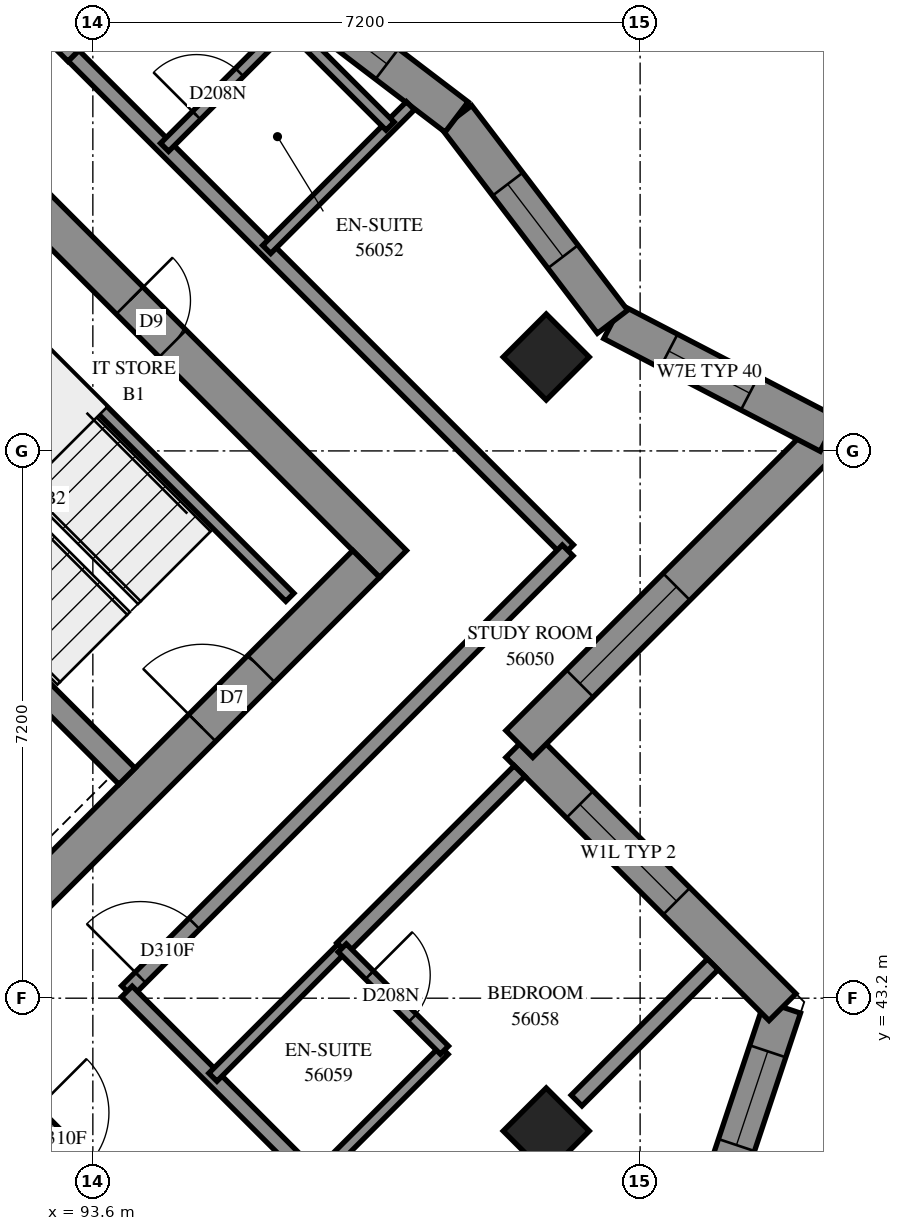
"""IFC4 building model, lengths in metres.
Left out: names, types, materials, properties, quantities, classifications, styles, units other than length and angle.
Written with IfcOpenShell. Run it as: python <this file> out.ifc"""

import sys

from ifc_helpers import new_model, si_unit, direction, frame, frame_2d, origin, origin_2d, place, context, subcontext, project, spatial, polyline, rectangle, outline, extrude, element, fill, save


model = new_model("IFC4")
c1 = context("Model", 3, precision=1e-05, world=origin(), true_north=direction((0.0, 1.0)))
c2 = subcontext(c1, "Body", "Model", "MODEL_VIEW")
j1 = project(units=[si_unit("LENGTHUNIT", "METRE"), si_unit("PLANEANGLEUNIT", "RADIAN")], contexts=[c1])
p1 = place(None, origin())
s1 = spatial("IfcSite", under=j1, at=p1, CompositionType="ELEMENT")
p2 = place(p1, origin())
s2 = spatial("IfcBuilding", under=s1, at=p2, CompositionType="ELEMENT")
p3 = place(p2, frame((0.0, 0.0, 206.6)))
s3 = spatial("IfcBuildingStorey", under=s2, at=p3, CompositionType="ELEMENT", Elevation=206.6)
for number, where, z_axis, x_axis in (
    (1, (99.565, 51.635, 0.0), (0.0, 0.0, 1.0), (0.707, -0.707, 0.0)),
    (2, (99.565, 41.453, 0.0), (0.0, 0.0, 1.0), (0.707, -0.707, 0.0)),
):
    element("IfcColumn", number, at=place(p3, frame(where, z_axis=z_axis, x_axis=x_axis)), inside=s3, PredefinedType="COLUMN", context=c2, shape_type="SweptSolid", body=[
        extrude(rectangle(XDim=0.8, YDim=0.8, at=origin_2d()), origin(), (0.0, 0.0, 1.0), 3.1),
    ])
p4 = place(p3, frame((86.66, 59.802, -0.3), z_axis=(0.0, 0.0, 1.0), x_axis=(0.7071067812, -0.7071067812, 0.0)))
e3 = element("IfcWall", 3, at=p4, inside=s3, PredefinedType="SHEAR", context=c2, shape_type="SweptSolid", body=[
    extrude(rectangle(XDim=15.4, YDim=0.5, at=frame_2d((7.7, 0.0))), origin(), (0.0, 0.0, 1.0), 2.7),
])
p5 = place(p4, frame((10.5, 0.0, 0.3)))
e4 = element("IfcOpeningElement", 4, at=p5, cuts=e3, PredefinedType="OPENING", context=c2, shape_type="SweptSolid", body=[
    extrude(rectangle(XDim=0.8, YDim=2.1, at=frame_2d((0.4, 1.05))), frame((0.0, 0.26, 0.0), z_axis=(0.0, -1.0, 0.0), x_axis=(1.0, 0.0, 0.0)), (0.0, 0.0, 1.0), 0.52),
])
p6 = place(p3, frame((87.013, 38.731, -0.3), z_axis=(0.0, 0.0, 1.0), x_axis=(0.7071067812, 0.7071067812, 0.0)))
e5 = element("IfcWall", 5, at=p6, inside=s3, PredefinedType="SHEAR", context=c2, shape_type="SweptSolid", body=[
    extrude(rectangle(XDim=14.4, YDim=0.5, at=frame_2d((7.2, 0.0))), origin(), (0.0, 0.0, 1.0), 2.7),
])
p7 = place(p6, frame((4.55, 0.0, 0.3)))
e6 = element("IfcOpeningElement", 6, at=p7, cuts=e5, PredefinedType="OPENING", context=c2, shape_type="SweptSolid", body=[
    extrude(rectangle(XDim=1.1, YDim=2.1, at=frame_2d((0.55, 1.05))), frame((0.0, 0.26, 0.0), z_axis=(0.0, -1.0, 0.0), x_axis=(1.0, 0.0, 0.0)), (0.0, 0.0, 1.0), 0.52),
])
p8 = place(p6, frame((11.35, 0.0, 0.3)))
e7 = element("IfcOpeningElement", 7, at=p8, cuts=e5, PredefinedType="OPENING", context=c2, shape_type="SweptSolid", body=[
    extrude(rectangle(XDim=1.1, YDim=2.1, at=frame_2d((0.55, 1.05))), frame((0.0, 0.26, 0.0), z_axis=(0.0, -1.0, 0.0), x_axis=(1.0, 0.0, 0.0)), (0.0, 0.0, 1.0), 0.52),
])
p9 = place(p3, frame((88.958, 51.211, 0.0), z_axis=(0.0, 0.0, 1.0), x_axis=(0.7070998367, -0.7071137256, 0.0)))
e8 = element("IfcWall", 8, at=p9, inside=s3, PredefinedType="SOLIDWALL", context=c2, shape_type="SweptSolid", body=[
    extrude(rectangle(XDim=7.2, YDim=0.3, at=frame_2d((3.6, 0.0))), origin(), (0.0, 0.0, 1.0), 3.1),
])
p10 = place(p3, frame((101.062, 38.252, 0.0), z_axis=(0.0, 0.0, 1.0), x_axis=(0.3162395484, 0.9486793705, 0.0)))
e9 = element("IfcWall", 9, at=p10, inside=s3, PredefinedType="SOLIDWALL", context=c2, shape_type="SweptSolid", body=[
    extrude(outline(polyline([(-0.12, -0.25), (5.247, -0.25), (4.938, 0.25), (0.12, 0.25), (-0.12, -0.25)])), origin(), (0.0, 0.0, 1.0), 3.1),
])
p11 = place(p10, frame((1.68, 0.0, 0.45)))
e10 = element("IfcOpeningElement", 10, at=p11, cuts=e9, PredefinedType="OPENING", context=c2, shape_type="SweptSolid", body=[
    extrude(rectangle(XDim=1.3, YDim=2.5, at=frame_2d((0.65, 1.25))), frame((0.0, 0.26, 0.0), z_axis=(0.0, -1.0, 0.0), x_axis=(1.0, 0.0, 0.0)), (0.0, 0.0, 1.0), 0.52),
])
p12 = place(p10, frame((3.18, 0.0, 0.45)))
e11 = element("IfcOpeningElement", 11, at=p12, cuts=e9, PredefinedType="OPENING", context=c2, shape_type="SweptSolid", body=[
    extrude(rectangle(XDim=1.3, YDim=2.5, at=frame_2d((0.65, 1.25))), frame((0.0, 0.26, 0.0), z_axis=(0.0, -1.0, 0.0), x_axis=(1.0, 0.0, 0.0)), (0.0, 0.0, 1.0), 0.52),
])
p13 = place(p3, frame((102.673, 43.083, 0.0), z_axis=(0.0, 0.0, 1.0), x_axis=(-0.7071067812, 0.7071067812, 0.0)))
e12 = element("IfcWall", 12, at=p13, inside=s3, PredefinedType="SOLIDWALL", context=c2, shape_type="SweptSolid", body=[
    extrude(outline(polyline([(-0.154, -0.25), (4.646, -0.25), (5.146, 0.25), (0.154, 0.25), (-0.154, -0.25)])), origin(), (0.0, 0.0, 1.0), 3.1),
])
p14 = place(p13, frame((1.97, 0.0, 0.6)))
e13 = element("IfcOpeningElement", 13, at=p14, cuts=e12, PredefinedType="OPENING", context=c2, shape_type="SweptSolid", body=[
    extrude(rectangle(XDim=1.8, YDim=1.9, at=frame_2d((0.9, 0.95))), frame((0.0, 0.26, 0.0), z_axis=(0.0, -1.0, 0.0), x_axis=(1.0, 0.0, 0.0)), (0.0, 0.0, 1.0), 0.52),
])
p15 = place(p3, frame((99.211, 46.544, 0.0), z_axis=(0.0, 0.0, 1.0), x_axis=(0.7071067812, 0.7071067812, 0.0)))
e14 = element("IfcWall", 14, at=p15, inside=s3, PredefinedType="SOLIDWALL", context=c2, shape_type="SweptSolid", body=[
    extrude(outline(polyline([(0.25, -0.25), (6.101, -0.25), (5.419, 0.25), (-0.25, 0.25), (0.25, -0.25)])), origin(), (0.0, 0.0, 1.0), 3.1),
])
p16 = place(p15, frame((1.125, 0.0, 0.6)))
e15 = element("IfcOpeningElement", 15, at=p16, cuts=e14, PredefinedType="OPENING", context=c2, shape_type="SweptSolid", body=[
    extrude(rectangle(XDim=1.8, YDim=1.9, at=frame_2d((0.9, 0.95))), frame((0.0, 0.26, 0.0), z_axis=(0.0, -1.0, 0.0), x_axis=(1.0, 0.0, 0.0)), (0.0, 0.0, 1.0), 0.52),
])
p17 = place(p3, frame((103.284, 50.617, 0.0), z_axis=(0.0, 0.0, 1.0), x_axis=(-0.8870249402, 0.4617215129, 0.0)))
e16 = element("IfcWall", 16, at=p17, inside=s3, PredefinedType="SOLIDWALL", context=c2, shape_type="SweptSolid", body=[
    extrude(outline(polyline([(-0.341, -0.25), (3.154, -0.25), (3.266, 0.25), (0.341, 0.25), (-0.341, -0.25)])), origin(), (0.0, 0.0, 1.0), 3.1),
])
p18 = place(p17, frame((1.175, 0.0, 0.45)))
e17 = element("IfcOpeningElement", 17, at=p18, cuts=e16, PredefinedType="OPENING", context=c2, shape_type="SweptSolid", body=[
    extrude(rectangle(XDim=1.2, YDim=2.5, at=frame_2d((0.6, 1.25))), frame((0.0, 0.26, 0.0), z_axis=(0.0, -1.0, 0.0), x_axis=(1.0, 0.0, 0.0)), (0.0, 0.0, 1.0), 0.52),
])
p19 = place(p3, frame((100.437, 52.099, 0.0), z_axis=(0.0, 0.0, 1.0), x_axis=(-0.6059097208, 0.7955334124, 0.0)))
e18 = element("IfcWall", 18, at=p19, inside=s3, PredefinedType="SOLIDWALL", context=c2, shape_type="SweptSolid", body=[
    extrude(outline(polyline([(0.056, -0.25), (3.42, -0.25), (3.352, 0.25), (-0.056, 0.25), (0.056, -0.25)])), origin(), (0.0, 0.0, 1.0), 3.1),
])
p20 = place(p19, frame((1.076, 0.0, 0.45)))
e19 = element("IfcOpeningElement", 19, at=p20, cuts=e18, PredefinedType="OPENING", context=c2, shape_type="SweptSolid", body=[
    extrude(rectangle(XDim=1.2, YDim=2.5, at=frame_2d((0.6, 1.25))), frame((0.0, 0.26, 0.0), z_axis=(0.0, -1.0, 0.0), x_axis=(1.0, 0.0, 0.0)), (0.0, 0.0, 1.0), 0.52),
])
p21 = place(p3, frame((98.385, 54.793, 0.0), z_axis=(0.0, 0.0, 1.0), x_axis=(-0.7955183856, 0.6059294498, 0.0)))
e20 = element("IfcWall", 20, at=p21, inside=s3, PredefinedType="SOLIDWALL", context=c2, shape_type="SweptSolid", body=[
    extrude(outline(polyline([(-0.034, -0.25), (3.33, -0.25), (3.397, 0.25), (0.034, 0.25), (-0.034, -0.25)])), origin(), (0.0, 0.0, 1.0), 3.1),
])
p22 = place(p21, frame((1.151, 0.0, 0.45)))
e21 = element("IfcOpeningElement", 21, at=p22, cuts=e20, PredefinedType="OPENING", context=c2, shape_type="SweptSolid", body=[
    extrude(rectangle(XDim=1.2, YDim=2.5, at=frame_2d((0.6, 1.25))), frame((0.0, 0.26, 0.0), z_axis=(0.0, -1.0, 0.0), x_axis=(1.0, 0.0, 0.0)), (0.0, 0.0, 1.0), 0.52),
])
p23 = place(p3, frame((91.313, 53.354, 0.0), z_axis=(0.0, 0.0, 1.0), x_axis=(0.7071140275, -0.7070995348, 0.0)))
e22 = element("IfcWall", 22, at=p23, inside=s3, PredefinedType="PARTITIONING", context=c2, shape_type="SweptSolid", body=[
    extrude(rectangle(XDim=6.9, YDim=0.15, at=frame_2d((3.45, 0.0))), origin(), (0.0, 0.0, 1.0), 3.1),
])
p24 = place(p3, frame((93.346, 55.599, 0.0), z_axis=(0.0, 0.0, 1.0), x_axis=(0.7071067812, -0.7071067812, 0.0)))
e23 = element("IfcWall", 23, at=p24, inside=s3, PredefinedType="PARTITIONING", context=c2, shape_type="SweptSolid", body=[
    extrude(rectangle(XDim=9.201, YDim=0.2, at=frame_2d((4.601, 0.0))), origin(), (0.0, 0.0, 1.0), 3.1),
])
p25 = place(p3, frame((94.049, 43.293, 0.0), z_axis=(0.0, 0.0, 1.0), x_axis=(0.7071067812, 0.7071067812, 0.0)))
e24 = element("IfcWall", 24, at=p25, inside=s3, PredefinedType="PARTITIONING", context=c2, shape_type="SweptSolid", body=[
    extrude(rectangle(XDim=8.2, YDim=0.2, at=frame_2d((4.1, 0.0))), origin(), (0.0, 0.0, 1.0), 3.1),
])
p26 = place(p25, frame((0.252, 0.0, 0.0)))
e25 = element("IfcOpeningElement", 25, at=p26, cuts=e24, PredefinedType="OPENING", context=c2, shape_type="SweptSolid", body=[
    extrude(rectangle(XDim=1.0, YDim=2.1, at=frame_2d((0.5, 1.05))), frame((0.0, 0.11, 0.0), z_axis=(0.0, -1.0, 0.0), x_axis=(1.0, 0.0, 0.0)), (0.0, 0.0, 1.0), 0.22),
])
p27 = place(p3, frame((94.047, 43.287, 0.0), z_axis=(0.0, 0.0, 1.0), x_axis=(0.7071067812, -0.7071067812, 0.0)))
e26 = element("IfcWall", 26, at=p27, inside=s3, PredefinedType="PARTITIONING", context=c2, shape_type="SweptSolid", body=[
    extrude(rectangle(XDim=5.199, YDim=0.2, at=frame_2d((2.599, 0.0))), origin(), (0.0, 0.0, 1.0), 3.1),
])
p28 = place(p27, frame((3.898, 0.0, 0.0)))
e27 = element("IfcOpeningElement", 27, at=p28, cuts=e26, PredefinedType="OPENING", context=c2, shape_type="SweptSolid", body=[
    extrude(rectangle(XDim=0.9, YDim=2.1, at=frame_2d((0.45, 1.05))), frame((0.0, 0.11, 0.0), z_axis=(0.0, -1.0, 0.0), x_axis=(1.0, 0.0, 0.0)), (0.0, 0.0, 1.0), 0.22),
])
p29 = place(p3, frame((92.633, 41.873, 0.0), z_axis=(0.0, 0.0, 1.0), x_axis=(0.7071067812, -0.7071067812, 0.0)))
e28 = element("IfcWall", 28, at=p29, inside=s3, PredefinedType="PARTITIONING", context=c2, shape_type="SweptSolid", body=[
    extrude(rectangle(XDim=5.199, YDim=0.2, at=frame_2d((2.599, 0.0))), origin(), (0.0, 0.0, 1.0), 3.1),
])
p30 = place(p29, frame((0.253, 0.0, 0.0)))
e29 = element("IfcOpeningElement", 29, at=p30, cuts=e28, PredefinedType="OPENING", context=c2, shape_type="SweptSolid", body=[
    extrude(rectangle(XDim=1.0, YDim=2.1, at=frame_2d((0.5, 1.05))), frame((0.0, 0.11, 0.0), z_axis=(0.0, -1.0, 0.0), x_axis=(1.0, 0.0, 0.0)), (0.0, 0.0, 1.0), 0.22),
])
p31 = place(p29, frame((3.948, 0.0, 0.0)))
e30 = element("IfcOpeningElement", 30, at=p31, cuts=e28, PredefinedType="OPENING", context=c2, shape_type="SweptSolid", body=[
    extrude(rectangle(XDim=0.9, YDim=2.1, at=frame_2d((0.45, 1.05))), frame((0.0, 0.11, 0.0), z_axis=(0.0, -1.0, 0.0), x_axis=(1.0, 0.0, 0.0)), (0.0, 0.0, 1.0), 0.22),
])
p32 = place(p3, frame((96.88, 43.856, 0.0), z_axis=(0.0, 0.0, 1.0), x_axis=(0.7074098182, 0.7068036142, 0.0)))
e31 = element("IfcWall", 31, at=p32, inside=s3, PredefinedType="PARTITIONING", context=c2, shape_type="SweptSolid", body=[
    extrude(rectangle(XDim=3.299, YDim=0.2, at=frame_2d((1.65, 0.0))), origin(), (0.0, 0.0, 1.0), 3.1),
])
p33 = place(p3, frame((95.887, 53.051, 0.0), z_axis=(0.0, 0.0, 1.0), x_axis=(0.7070880799, 0.707125482, 0.0)))
e32 = element("IfcWall", 32, at=p33, inside=s3, PredefinedType="PARTITIONING", context=c2, shape_type="SweptSolid", body=[
    extrude(rectangle(XDim=2.674, YDim=0.15, at=frame_2d((1.337, 0.0))), origin(), (0.0, 0.0, 1.0), 3.1),
])
p34 = place(p3, frame((99.964, 41.854, 0.0), z_axis=(0.0, 0.0, 1.0), x_axis=(0.7071265121, 0.7070870497, 0.0)))
e33 = element("IfcWall", 33, at=p34, inside=s3, PredefinedType="PARTITIONING", context=c2, shape_type="SweptSolid", body=[
    extrude(rectangle(XDim=2.534, YDim=0.2, at=frame_2d((1.267, 0.0))), origin(), (0.0, 0.0, 1.0), 3.1),
])
for number, where, z_axis, x_axis in (
    (34, (96.523, 40.817, 0.0), (0.0, 0.0, 1.0), (0.707, 0.707, 0.0)),
    (35, (95.179, 42.161, 0.0), (0.0, 0.0, 1.0), (0.707, 0.707, 0.0)),
):
    element("IfcWall", number, at=place(p3, frame(where, z_axis=z_axis, x_axis=x_axis)), inside=s3, PredefinedType="PARTITIONING", context=c2, shape_type="SweptSolid", body=[
        extrude(rectangle(XDim=2.401, YDim=0.15, at=frame_2d((1.201, 0.0))), origin(), (0.0, 0.0, 1.0), 3.1),
    ])
p35 = place(p3, frame((94.544, 54.394, 0.0), z_axis=(0.0, 0.0, 1.0), x_axis=(0.7070860901, 0.7071274716, 0.0)))
e36 = element("IfcWall", 36, at=p35, inside=s3, PredefinedType="PARTITIONING", context=c2, shape_type="SweptSolid", body=[
    extrude(rectangle(XDim=2.417, YDim=0.15, at=frame_2d((1.208, 0.0))), origin(), (0.0, 0.0, 1.0), 3.1),
])
p36 = place(p35, frame((0.594, 0.0, 0.0)))
e37 = element("IfcOpeningElement", 37, at=p36, cuts=e36, PredefinedType="OPENING", context=c2, shape_type="SweptSolid", body=[
    extrude(rectangle(XDim=0.8, YDim=2.1, at=frame_2d((0.4, 1.05))), frame((0.0, 0.085, 0.0), z_axis=(0.0, -1.0, 0.0), x_axis=(1.0, 0.0, 0.0)), (0.0, 0.0, 1.0), 0.17),
])
p37 = place(p3, frame((96.167, 56.017, 0.0), z_axis=(0.0, 0.0, 1.0), x_axis=(0.7071067812, -0.7071067812, 0.0)))
e38 = element("IfcWall", 38, at=p37, inside=s3, PredefinedType="PARTITIONING", context=c2, shape_type="SweptSolid", body=[
    extrude(rectangle(XDim=1.901, YDim=0.15, at=frame_2d((0.95, 0.0))), origin(), (0.0, 0.0, 1.0), 3.1),
])
p38 = place(p3, frame((96.881, 43.861, 0.0), z_axis=(0.0, 0.0, 1.0), x_axis=(0.7071067812, -0.7071067812, 0.0)))
e39 = element("IfcWall", 39, at=p38, inside=s3, PredefinedType="PARTITIONING", context=c2, shape_type="SweptSolid", body=[
    extrude(rectangle(XDim=1.901, YDim=0.15, at=frame_2d((0.95, 0.0))), origin(), (0.0, 0.0, 1.0), 3.1),
])
p39 = place(p38, frame((0.505, 0.0, 0.0)))
e40 = element("IfcOpeningElement", 40, at=p39, cuts=e39, PredefinedType="OPENING", context=c2, shape_type="SweptSolid", body=[
    extrude(rectangle(XDim=0.8, YDim=2.1, at=frame_2d((0.4, 1.05))), frame((0.0, 0.085, 0.0), z_axis=(0.0, -1.0, 0.0), x_axis=(1.0, 0.0, 0.0)), (0.0, 0.0, 1.0), 0.17),
])
p40 = place(p3, frame((92.311, 56.627, 0.0), z_axis=(0.0, 0.0, 1.0), x_axis=(0.7077922938, -0.7064206033, 0.0)))
e41 = element("IfcWall", 41, at=p40, inside=s3, PredefinedType="PARTITIONING", context=c2, shape_type="SweptSolid", body=[
    extrude(rectangle(XDim=1.458, YDim=0.2, at=frame_2d((0.729, 0.0))), origin(), (0.0, 0.0, 1.0), 3.1),
])
p41 = place(p12, origin())
e42 = element("IfcWindow", 42, at=p41, inside=s3, PartitioningType="SINGLE_PANEL", PredefinedType="WINDOW", context=c2, shape_type="SweptSolid", body=[
    extrude(rectangle(XDim=1.3, YDim=2.5, at=frame_2d((0.65, 1.25))), frame((0.0, 0.18, 0.0), z_axis=(0.0, -1.0, 0.0), x_axis=(1.0, 0.0, 0.0)), (0.0, 0.0, 1.0), 0.06),
])
fill(e11, e42)
p42 = place(p14, origin())
e43 = element("IfcWindow", 43, at=p42, inside=s3, PartitioningType="SINGLE_PANEL", PredefinedType="WINDOW", context=c2, shape_type="SweptSolid", body=[
    extrude(rectangle(XDim=1.8, YDim=1.9, at=frame_2d((0.9, 0.95))), frame((0.0, 0.18, 0.0), z_axis=(0.0, -1.0, 0.0), x_axis=(1.0, 0.0, 0.0)), (0.0, 0.0, 1.0), 0.06),
])
fill(e13, e43)
p43 = place(p16, origin())
e44 = element("IfcWindow", 44, at=p43, inside=s3, PartitioningType="SINGLE_PANEL", PredefinedType="WINDOW", context=c2, shape_type="SweptSolid", body=[
    extrude(rectangle(XDim=1.8, YDim=1.9, at=frame_2d((0.9, 0.95))), frame((0.0, 0.18, 0.0), z_axis=(0.0, -1.0, 0.0), x_axis=(1.0, 0.0, 0.0)), (0.0, 0.0, 1.0), 0.06),
])
fill(e15, e44)
p44 = place(p18, origin())
e45 = element("IfcWindow", 45, at=p44, inside=s3, PartitioningType="SINGLE_PANEL", PredefinedType="WINDOW", context=c2, shape_type="SweptSolid", body=[
    extrude(rectangle(XDim=1.2, YDim=2.5, at=frame_2d((0.6, 1.25))), frame((0.0, 0.18, 0.0), z_axis=(0.0, -1.0, 0.0), x_axis=(1.0, 0.0, 0.0)), (0.0, 0.0, 1.0), 0.06),
])
fill(e17, e45)
p45 = place(p20, origin())
e46 = element("IfcWindow", 46, at=p45, inside=s3, PartitioningType="SINGLE_PANEL", PredefinedType="WINDOW", context=c2, shape_type="SweptSolid", body=[
    extrude(rectangle(XDim=1.2, YDim=2.5, at=frame_2d((0.6, 1.25))), frame((0.0, 0.18, 0.0), z_axis=(0.0, -1.0, 0.0), x_axis=(1.0, 0.0, 0.0)), (0.0, 0.0, 1.0), 0.06),
])
fill(e19, e46)
p46 = place(p22, origin())
e47 = element("IfcWindow", 47, at=p46, inside=s3, PartitioningType="SINGLE_PANEL", PredefinedType="WINDOW", context=c2, shape_type="SweptSolid", body=[
    extrude(rectangle(XDim=1.2, YDim=2.5, at=frame_2d((0.6, 1.25))), frame((0.0, 0.18, 0.0), z_axis=(0.0, -1.0, 0.0), x_axis=(1.0, 0.0, 0.0)), (0.0, 0.0, 1.0), 0.06),
])
fill(e21, e47)
p47 = place(p5, origin())
e48 = element("IfcDoor", 48, at=p47, inside=s3, OperationType="SINGLE_SWING_RIGHT", PredefinedType="DOOR", context=c2, shape_type="SweptSolid", body=[
    extrude(rectangle(XDim=0.8, YDim=2.1, at=frame_2d((0.4, 1.05))), frame((0.0, 0.025, 0.0), z_axis=(0.0, -1.0, 0.0), x_axis=(1.0, 0.0, 0.0)), (0.0, 0.0, 1.0), 0.05),
])
fill(e4, e48)
p48 = place(p8, origin())
e49 = element("IfcDoor", 49, at=p48, inside=s3, OperationType="SINGLE_SWING_RIGHT", PredefinedType="DOOR", context=c2, shape_type="SweptSolid", body=[
    extrude(rectangle(XDim=1.1, YDim=2.1, at=frame_2d((0.55, 1.05))), frame((0.0, 0.025, 0.0), z_axis=(0.0, -1.0, 0.0), x_axis=(1.0, 0.0, 0.0)), (0.0, 0.0, 1.0), 0.05),
])
fill(e7, e49)
p49 = place(p26, origin())
e50 = element("IfcDoor", 50, at=p49, inside=s3, OperationType="SINGLE_SWING_RIGHT", PredefinedType="DOOR", context=c2, shape_type="SweptSolid", body=[
    extrude(rectangle(XDim=1.0, YDim=2.1, at=frame_2d((0.5, 1.05))), frame((0.0, 0.025, 0.0), z_axis=(0.0, -1.0, 0.0), x_axis=(1.0, 0.0, 0.0)), (0.0, 0.0, 1.0), 0.05),
])
fill(e25, e50)
p50 = place(p36, origin())
e51 = element("IfcDoor", 51, at=p50, inside=s3, OperationType="SINGLE_SWING_RIGHT", PredefinedType="DOOR", context=c2, shape_type="SweptSolid", body=[
    extrude(rectangle(XDim=0.8, YDim=2.1, at=frame_2d((0.4, 1.05))), frame((0.0, 0.025, 0.0), z_axis=(0.0, -1.0, 0.0), x_axis=(1.0, 0.0, 0.0)), (0.0, 0.0, 1.0), 0.05),
])
fill(e37, e51)
p51 = place(p30, origin())
e52 = element("IfcDoor", 52, at=p51, inside=s3, OperationType="SINGLE_SWING_RIGHT", PredefinedType="DOOR", context=c2, shape_type="SweptSolid", body=[
    extrude(rectangle(XDim=1.0, YDim=2.1, at=frame_2d((0.5, 1.05))), frame((0.0, 0.025, 0.0), z_axis=(0.0, -1.0, 0.0), x_axis=(1.0, 0.0, 0.0)), (0.0, 0.0, 1.0), 0.05),
])
fill(e29, e52)
p52 = place(p39, origin())
e53 = element("IfcDoor", 53, at=p52, inside=s3, OperationType="SINGLE_SWING_RIGHT", PredefinedType="DOOR", context=c2, shape_type="SweptSolid", body=[
    extrude(rectangle(XDim=0.8, YDim=2.1, at=frame_2d((0.4, 1.05))), frame((0.0, 0.025, 0.0), z_axis=(0.0, -1.0, 0.0), x_axis=(1.0, 0.0, 0.0)), (0.0, 0.0, 1.0), 0.05),
])
fill(e40, e53)
save(model, sys.argv[1])
